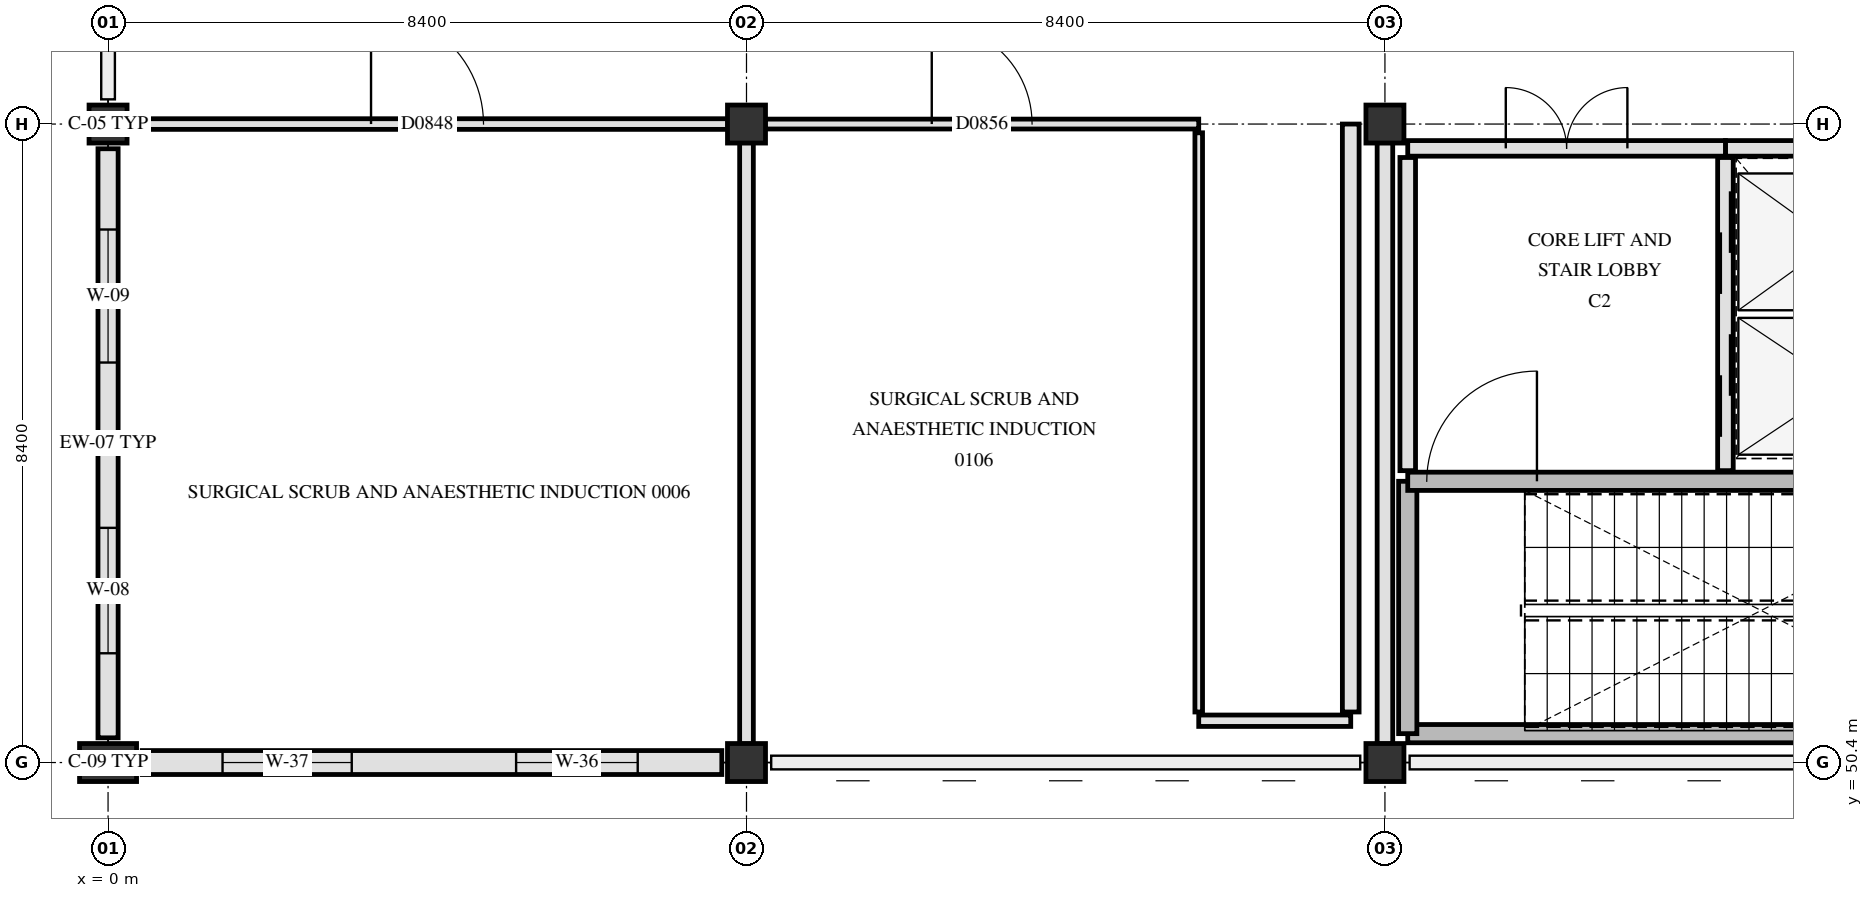
"""IFC4 building model, lengths in metres.
Left out: names, types, materials, properties, quantities, classifications, styles, units other than length and angle.
Written with IfcOpenShell. Run it as: python <this file> out.ifc"""

import sys

from ifc_helpers import new_model, si_unit, direction, frame, frame_2d, origin, origin_2d, place, context, subcontext, project, spatial, rectangle, extrude, element, fill, save


model = new_model("IFC4")
c1 = context("Model", 3, precision=1e-05, world=origin(), true_north=direction((0.0, 1.0)))
c2 = subcontext(c1, "Body", "Model", "MODEL_VIEW")
j1 = project(units=[si_unit("LENGTHUNIT", "METRE"), si_unit("PLANEANGLEUNIT", "RADIAN")], contexts=[c1])
p1 = place(None, origin())
s1 = spatial("IfcSite", under=j1, at=p1, CompositionType="ELEMENT")
p2 = place(p1, origin())
s2 = spatial("IfcBuilding", under=s1, at=p2, CompositionType="ELEMENT")
p3 = place(p2, frame((0.0, 0.0, 9.3)))
s3 = spatial("IfcBuildingStorey", under=s2, at=p3, CompositionType="ELEMENT", Elevation=9.3)
p4 = place(p3, frame((0.0, 50.4, 0.0), z_axis=(0.0, 0.0, 1.0), x_axis=(0.0, 1.0, 0.0)))
e1 = element("IfcColumn", 1, at=p4, inside=s3, PredefinedType="PILASTER", context=c2, shape_type="SweptSolid", body=[
    extrude(rectangle(XDim=0.5, YDim=0.75, at=origin_2d()), origin(), (0.0, 0.0, 1.0), 5.1),
])
for number, where, z_axis, x_axis in (
    (2, (0.0, 58.8, 0.0), (0.0, 0.0, 1.0), (1.0, 0.0, 0.0)),
    (3, (8.4, 50.4, 0.0), (0.0, 0.0, 1.0), (1.0, 0.0, 0.0)),
    (4, (8.4, 58.8, 0.0), (0.0, 0.0, 1.0), (1.0, 0.0, 0.0)),
    (5, (16.8, 50.4, 0.0), (0.0, 0.0, 1.0), (1.0, 0.0, 0.0)),
    (6, (16.8, 58.8, 0.0), (0.0, 0.0, 1.0), (1.0, 0.0, 0.0)),
):
    element("IfcColumn", number, at=place(p3, frame(where, z_axis=z_axis, x_axis=x_axis)), inside=s3, PredefinedType="COLUMN", context=c2, shape_type="SweptSolid", body=[
        extrude(rectangle(XDim=0.5, YDim=0.5, at=origin_2d()), origin(), (0.0, 0.0, 1.0), 5.1),
    ])
p5 = place(p3, frame((0.0, 50.725, 0.0), z_axis=(0.0, 0.0, 1.0), x_axis=(0.0, 1.0, 0.0)))
e7 = element("IfcWall", 7, at=p5, inside=s3, PredefinedType="SOLIDWALL", context=c2, shape_type="SweptSolid", body=[
    extrude(rectangle(XDim=7.75, YDim=0.265, at=frame_2d((3.875, 0.0))), origin(), (0.0, 0.0, 1.0), 4.07),
])
p6 = place(p5, frame((1.113, 0.0, 0.85)))
e8 = element("IfcOpeningElement", 8, at=p6, cuts=e7, PredefinedType="OPENING", context=c2, shape_type="SweptSolid", body=[
    extrude(rectangle(XDim=1.65, YDim=1.3, at=frame_2d((0.825, 0.65))), frame((0.0, 0.142, 0.0), z_axis=(0.0, -1.0, 0.0), x_axis=(1.0, 0.0, 0.0)), (0.0, 0.0, 1.0), 0.285),
])
p7 = place(p5, frame((4.938, 0.0, 0.85)))
e9 = element("IfcOpeningElement", 9, at=p7, cuts=e7, PredefinedType="OPENING", context=c2, shape_type="SweptSolid", body=[
    extrude(rectangle(XDim=1.75, YDim=1.3, at=frame_2d((0.875, 0.65))), frame((0.0, 0.142, 0.0), z_axis=(0.0, -1.0, 0.0), x_axis=(1.0, 0.0, 0.0)), (0.0, 0.0, 1.0), 0.285),
])
p8 = place(p3, frame((8.075, 50.4, 0.0), z_axis=(0.0, 0.0, 1.0), x_axis=(-1.0, 0.0, 0.0)))
e10 = element("IfcWall", 10, at=p8, inside=s3, PredefinedType="SOLIDWALL", context=c2, shape_type="SweptSolid", body=[
    extrude(rectangle(XDim=7.625, YDim=0.315, at=frame_2d((3.812, 0.0))), origin(), (0.0, 0.0, 1.0), 4.07),
])
p9 = place(p8, frame((1.106, 0.0, 0.85)))
e11 = element("IfcOpeningElement", 11, at=p9, cuts=e10, PredefinedType="OPENING", context=c2, shape_type="SweptSolid", body=[
    extrude(rectangle(XDim=1.6, YDim=1.66, at=frame_2d((0.8, 0.83))), frame((0.0, 0.167, 0.0), z_axis=(0.0, -1.0, 0.0), x_axis=(1.0, 0.0, 0.0)), (0.0, 0.0, 1.0), 0.335),
])
p10 = place(p8, frame((4.869, 0.0, 0.85)))
e12 = element("IfcOpeningElement", 12, at=p10, cuts=e10, PredefinedType="OPENING", context=c2, shape_type="SweptSolid", body=[
    extrude(rectangle(XDim=1.7, YDim=1.66, at=frame_2d((0.85, 0.83))), frame((0.0, 0.167, 0.0), z_axis=(0.0, -1.0, 0.0), x_axis=(1.0, 0.0, 0.0)), (0.0, 0.0, 1.0), 0.335),
])
p11 = place(p3, frame((17.1, 50.78, 0.0), z_axis=(0.0, 0.0, 1.0), x_axis=(1.0, 0.0, 0.0)))
e13 = element("IfcWall", 13, at=p11, inside=s3, PredefinedType="SHEAR", context=c2, shape_type="SweptSolid", body=[
    extrude(rectangle(XDim=7.82, YDim=0.24, at=frame_2d((3.91, 0.0))), origin(), (0.0, 0.0, 1.0), 4.78),
])
p12 = place(p3, frame((17.1, 50.78, 0.0), z_axis=(0.0, 0.0, 1.0), x_axis=(0.0, 1.0, 0.0)))
e14 = element("IfcWall", 14, at=p12, inside=s3, PredefinedType="SHEAR", context=c2, shape_type="SweptSolid", body=[
    extrude(rectangle(XDim=3.32, YDim=0.24, at=frame_2d((1.66, 0.0))), origin(), (0.0, 0.0, 1.0), 4.78),
])
p13 = place(p3, frame((17.1, 54.1, 0.0), z_axis=(0.0, 0.0, 1.0), x_axis=(1.0, 0.0, 0.0)))
e15 = element("IfcWall", 15, at=p13, inside=s3, PredefinedType="SHEAR", context=c2, shape_type="SweptSolid", body=[
    extrude(rectangle(XDim=7.82, YDim=0.24, at=frame_2d((3.91, 0.0))), origin(), (0.0, 0.0, 1.0), 4.78),
])
p14 = place(p13, frame((0.25, 0.0, 0.0)))
e16 = element("IfcOpeningElement", 16, at=p14, cuts=e15, PredefinedType="OPENING", context=c2, shape_type="SweptSolid", body=[
    extrude(rectangle(XDim=1.45, YDim=2.2, at=frame_2d((0.725, 1.1))), frame((0.0, 0.13, 0.0), z_axis=(0.0, -1.0, 0.0), x_axis=(1.0, 0.0, 0.0)), (0.0, 0.0, 1.0), 0.26),
])
p15 = place(p3, frame((21.28, 54.24, 0.0), z_axis=(0.0, 0.0, 1.0), x_axis=(0.0, 1.0, 0.0)))
e17 = element("IfcWall", 17, at=p15, inside=s3, PredefinedType="PARTITIONING", context=c2, shape_type="SweptSolid", body=[
    extrude(rectangle(XDim=4.12, YDim=0.205, at=frame_2d((2.06, 0.0))), origin(), (0.0, 0.0, 1.0), 4.77),
])
p16 = place(p15, frame((0.445, 0.0, 0.0)))
e18 = element("IfcOpeningElement", 18, at=p16, cuts=e17, PredefinedType="OPENING", context=c2, shape_type="SweptSolid", body=[
    extrude(rectangle(XDim=1.35, YDim=2.2, at=frame_2d((0.675, 1.1))), frame((0.0, 0.113, 0.0), z_axis=(0.0, -1.0, 0.0), x_axis=(1.0, 0.0, 0.0)), (0.0, 0.0, 1.0), 0.225),
])
p17 = place(p15, frame((2.325, 0.0, 0.0)))
e19 = element("IfcOpeningElement", 19, at=p17, cuts=e17, PredefinedType="OPENING", context=c2, shape_type="SweptSolid", body=[
    extrude(rectangle(XDim=1.35, YDim=2.2, at=frame_2d((0.675, 1.1))), frame((0.0, 0.113, 0.0), z_axis=(0.0, -1.0, 0.0), x_axis=(1.0, 0.0, 0.0)), (0.0, 0.0, 1.0), 0.225),
])
p18 = place(p3, frame((21.28, 58.48, 0.0), z_axis=(0.0, 0.0, 1.0), x_axis=(1.0, 0.0, 0.0)))
e20 = element("IfcWall", 20, at=p18, inside=s3, PredefinedType="PARTITIONING", context=c2, shape_type="SweptSolid", body=[
    extrude(rectangle(XDim=3.57, YDim=0.205, at=frame_2d((1.785, 0.0))), origin(), (0.0, 0.0, 1.0), 4.02),
])
p19 = place(p3, frame((17.1, 54.24, 0.0), z_axis=(0.0, 0.0, 1.0), x_axis=(0.0, 1.0, 0.0)))
e21 = element("IfcWall", 21, at=p19, inside=s3, PredefinedType="PARTITIONING", context=c2, shape_type="SweptSolid", body=[
    extrude(rectangle(XDim=4.12, YDim=0.205, at=frame_2d((2.06, 0.0))), origin(), (0.0, 0.0, 1.0), 4.17),
])
p20 = place(p3, frame((17.1, 58.48, 0.0), z_axis=(0.0, 0.0, 1.0), x_axis=(1.0, 0.0, 0.0)))
e22 = element("IfcWall", 22, at=p20, inside=s3, PredefinedType="PARTITIONING", context=c2, shape_type="SweptSolid", body=[
    extrude(rectangle(XDim=4.18, YDim=0.205, at=frame_2d((2.09, 0.0))), origin(), (0.0, 0.0, 1.0), 4.02),
])
p21 = place(p20, frame((1.29, 0.0, 0.0)))
e23 = element("IfcOpeningElement", 23, at=p21, cuts=e22, PredefinedType="OPENING", context=c2, shape_type="SweptSolid", body=[
    extrude(rectangle(XDim=1.6, YDim=2.25, at=frame_2d((0.8, 1.125))), frame((0.0, 0.113, 0.0), z_axis=(0.0, -1.0, 0.0), x_axis=(1.0, 0.0, 0.0)), (0.0, 0.0, 1.0), 0.225),
])
p22 = place(p3, frame((14.35, 50.95, 0.0), z_axis=(0.0, 0.0, 1.0), x_axis=(1.0, 0.0, 0.0)))
e24 = element("IfcWall", 24, at=p22, inside=s3, PredefinedType="PARTITIONING", context=c2, shape_type="SweptSolid", body=[
    extrude(rectangle(XDim=2.0, YDim=0.15, at=frame_2d((1.0, 0.0))), origin(), (0.0, 0.0, 1.0), 4.77),
])
p23 = place(p3, frame((0.245, 58.8, 0.0), z_axis=(0.0, 0.0, 1.0), x_axis=(1.0, 0.0, 0.0)))
e25 = element("IfcWall", 25, at=p23, inside=s3, PredefinedType="PARTITIONING", context=c2, shape_type="SweptSolid", body=[
    extrude(rectangle(XDim=7.91, YDim=0.14, at=frame_2d((3.955, 0.0))), origin(), (0.0, 0.0, 1.0), 4.02),
])
p24 = place(p23, frame((3.215, 0.0, 0.0)))
e26 = element("IfcOpeningElement", 26, at=p24, cuts=e25, PredefinedType="OPENING", context=c2, shape_type="SweptSolid", body=[
    extrude(rectangle(XDim=1.48, YDim=2.22, at=frame_2d((0.74, 1.11))), frame((0.0, 0.08, 0.0), z_axis=(0.0, -1.0, 0.0), x_axis=(1.0, 0.0, 0.0)), (0.0, 0.0, 1.0), 0.16),
])
p25 = place(p3, frame((8.645, 58.8, 0.0), z_axis=(0.0, 0.0, 1.0), x_axis=(1.0, 0.0, 0.0)))
e27 = element("IfcWall", 27, at=p25, inside=s3, PredefinedType="PARTITIONING", context=c2, shape_type="SweptSolid", body=[
    extrude(rectangle(XDim=5.705, YDim=0.13, at=frame_2d((2.853, 0.0))), origin(), (0.0, 0.0, 1.0), 4.02),
])
p26 = place(p25, frame((2.192, 0.0, 0.0)))
e28 = element("IfcOpeningElement", 28, at=p26, cuts=e27, PredefinedType="OPENING", context=c2, shape_type="SweptSolid", body=[
    extrude(rectangle(XDim=1.32, YDim=2.18, at=frame_2d((0.66, 1.09))), frame((0.0, 0.075, 0.0), z_axis=(0.0, -1.0, 0.0), x_axis=(1.0, 0.0, 0.0)), (0.0, 0.0, 1.0), 0.15),
])
p27 = place(p3, frame((8.4, 50.645, 0.0), z_axis=(0.0, 0.0, 1.0), x_axis=(0.0, 1.0, 0.0)))
e29 = element("IfcWall", 29, at=p27, inside=s3, PredefinedType="PARTITIONING", context=c2, shape_type="SweptSolid", body=[
    extrude(rectangle(XDim=7.91, YDim=0.18, at=frame_2d((3.955, 0.0))), origin(), (0.0, 0.0, 1.0), 4.17),
])
p28 = place(p3, frame((14.35, 51.065, 0.0), z_axis=(0.0, 0.0, 1.0), x_axis=(0.0, 1.0, 0.0)))
e30 = element("IfcWall", 30, at=p28, inside=s3, PredefinedType="PARTITIONING", context=c2, shape_type="SweptSolid", body=[
    extrude(rectangle(XDim=7.62, YDim=0.1, at=frame_2d((3.81, 0.0))), origin(), (0.0, 0.0, 1.0), 4.02),
])
p29 = place(p3, frame((16.35, 51.065, 0.0), z_axis=(0.0, 0.0, 1.0), x_axis=(0.0, 1.0, 0.0)))
e31 = element("IfcWall", 31, at=p29, inside=s3, PredefinedType="PARTITIONING", context=c2, shape_type="SweptSolid", body=[
    extrude(rectangle(XDim=7.735, YDim=0.22, at=frame_2d((3.868, 0.0))), origin(), (0.0, 0.0, 1.0), 4.02),
])
p30 = place(p3, frame((16.8, 50.645, 0.0), z_axis=(0.0, 0.0, 1.0), x_axis=(0.0, 1.0, 0.0)))
e32 = element("IfcWall", 32, at=p30, inside=s3, PredefinedType="PARTITIONING", context=c2, shape_type="SweptSolid", body=[
    extrude(rectangle(XDim=7.91, YDim=0.205, at=frame_2d((3.955, 0.0))), origin(), (0.0, 0.0, 1.0), 4.17),
])
p31 = place(p6, origin())
e33 = element("IfcWindow", 33, at=p31, inside=s3, PartitioningType="SINGLE_PANEL", PredefinedType="WINDOW", context=c2, shape_type="SweptSolid", body=[
    extrude(rectangle(XDim=1.65, YDim=1.3, at=frame_2d((0.825, 0.65))), frame((0.0, 0.03, 0.0), z_axis=(0.0, -1.0, 0.0), x_axis=(1.0, 0.0, 0.0)), (0.0, 0.0, 1.0), 0.06),
])
fill(e8, e33)
p32 = place(p7, origin())
e34 = element("IfcWindow", 34, at=p32, inside=s3, PartitioningType="SINGLE_PANEL", PredefinedType="WINDOW", context=c2, shape_type="SweptSolid", body=[
    extrude(rectangle(XDim=1.75, YDim=1.3, at=frame_2d((0.875, 0.65))), frame((0.0, 0.03, 0.0), z_axis=(0.0, -1.0, 0.0), x_axis=(1.0, 0.0, 0.0)), (0.0, 0.0, 1.0), 0.06),
])
fill(e9, e34)
p33 = place(p9, origin())
e35 = element("IfcWindow", 35, at=p33, inside=s3, PartitioningType="SINGLE_PANEL", PredefinedType="WINDOW", context=c2, shape_type="SweptSolid", body=[
    extrude(rectangle(XDim=1.6, YDim=1.66, at=frame_2d((0.8, 0.83))), frame((0.0, 0.03, 0.0), z_axis=(0.0, -1.0, 0.0), x_axis=(1.0, 0.0, 0.0)), (0.0, 0.0, 1.0), 0.06),
])
fill(e11, e35)
p34 = place(p10, origin())
e36 = element("IfcWindow", 36, at=p34, inside=s3, PartitioningType="SINGLE_PANEL", PredefinedType="WINDOW", context=c2, shape_type="SweptSolid", body=[
    extrude(rectangle(XDim=1.7, YDim=1.66, at=frame_2d((0.85, 0.83))), frame((0.0, 0.03, 0.0), z_axis=(0.0, -1.0, 0.0), x_axis=(1.0, 0.0, 0.0)), (0.0, 0.0, 1.0), 0.06),
])
fill(e12, e36)
p35 = place(p14, origin())
e37 = element("IfcDoor", 37, at=p35, inside=s3, OperationType="SINGLE_SWING_RIGHT", PredefinedType="DOOR", context=c2, shape_type="SweptSolid", body=[
    extrude(rectangle(XDim=1.45, YDim=2.2, at=frame_2d((0.725, 1.1))), frame((0.0, 0.025, 0.0), z_axis=(0.0, -1.0, 0.0), x_axis=(1.0, 0.0, 0.0)), (0.0, 0.0, 1.0), 0.05),
])
fill(e16, e37)
p36 = place(p16, origin())
e38 = element("IfcDoor", 38, at=p36, inside=s3, OperationType="SLIDING_TO_LEFT", PredefinedType="DOOR", context=c2, shape_type="SweptSolid", body=[
    extrude(rectangle(XDim=1.35, YDim=2.2, at=frame_2d((0.675, 1.1))), frame((0.0, 0.025, 0.0), z_axis=(0.0, -1.0, 0.0), x_axis=(1.0, 0.0, 0.0)), (0.0, 0.0, 1.0), 0.05),
])
fill(e18, e38)
p37 = place(p17, origin())
e39 = element("IfcDoor", 39, at=p37, inside=s3, OperationType="SLIDING_TO_LEFT", PredefinedType="DOOR", context=c2, shape_type="SweptSolid", body=[
    extrude(rectangle(XDim=1.35, YDim=2.2, at=frame_2d((0.675, 1.1))), frame((0.0, 0.025, 0.0), z_axis=(0.0, -1.0, 0.0), x_axis=(1.0, 0.0, 0.0)), (0.0, 0.0, 1.0), 0.05),
])
fill(e19, e39)
p38 = place(p21, origin())
e40 = element("IfcDoor", 40, at=p38, inside=s3, OperationType="DOUBLE_SWING_LEFT", PredefinedType="DOOR", context=c2, shape_type="SweptSolid", body=[
    extrude(rectangle(XDim=1.6, YDim=2.25, at=frame_2d((0.8, 1.125))), frame((0.0, 0.025, 0.0), z_axis=(0.0, -1.0, 0.0), x_axis=(1.0, 0.0, 0.0)), (0.0, 0.0, 1.0), 0.05),
])
fill(e23, e40)
p39 = place(p24, origin())
e41 = element("IfcDoor", 41, at=p39, inside=s3, OperationType="SINGLE_SWING_LEFT", PredefinedType="DOOR", context=c2, shape_type="SweptSolid", body=[
    extrude(rectangle(XDim=1.48, YDim=2.22, at=frame_2d((0.74, 1.11))), frame((0.0, 0.025, 0.0), z_axis=(0.0, -1.0, 0.0), x_axis=(1.0, 0.0, 0.0)), (0.0, 0.0, 1.0), 0.05),
])
fill(e26, e41)
p40 = place(p26, origin())
e42 = element("IfcDoor", 42, at=p40, inside=s3, OperationType="SINGLE_SWING_LEFT", PredefinedType="DOOR", context=c2, shape_type="SweptSolid", body=[
    extrude(rectangle(XDim=1.32, YDim=2.18, at=frame_2d((0.66, 1.09))), frame((0.0, 0.025, 0.0), z_axis=(0.0, -1.0, 0.0), x_axis=(1.0, 0.0, 0.0)), (0.0, 0.0, 1.0), 0.05),
])
fill(e28, e42)
save(model, sys.argv[1])
